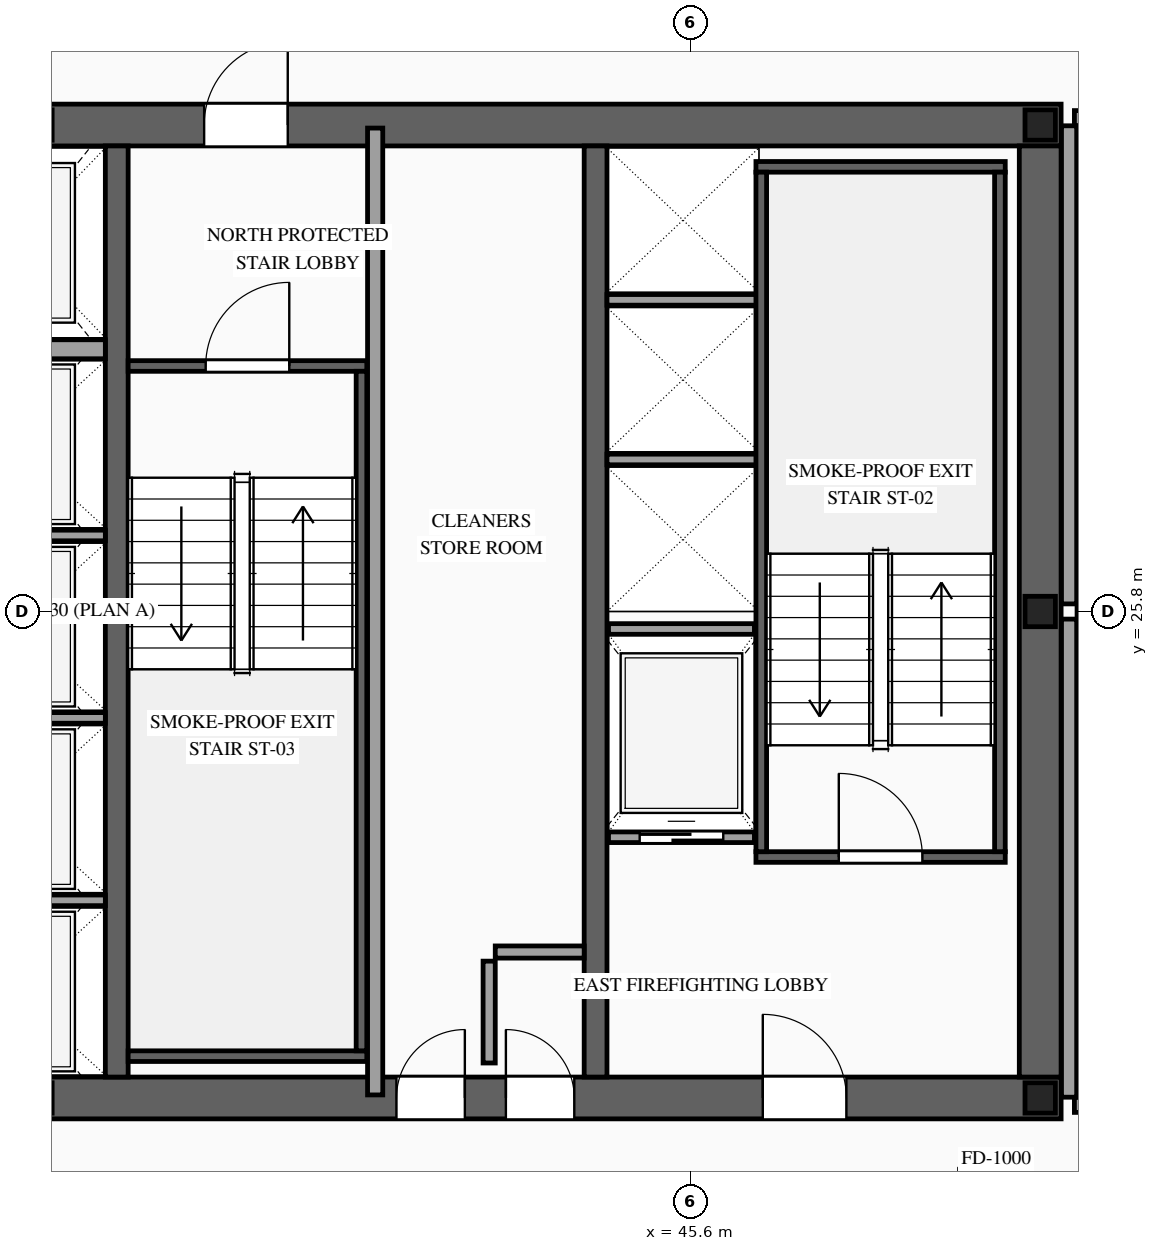
"""IFC4 building model, lengths in metres.
Left out: names, types, materials, properties, quantities, classifications, styles, units other than length and angle.
Written with IfcOpenShell. Run it as: python <this file> out.ifc"""

import sys

from ifc_helpers import new_model, si_unit, direction, frame, frame_2d, origin, origin_2d, place, context, subcontext, project, spatial, rectangle, i_section, extrude, source, transform, mapped, element, fill, save


model = new_model("IFC4")
c1 = context("Model", 3, precision=1e-05, world=origin(), true_north=direction((0.0, 1.0)))
c2 = subcontext(c1, "Body", "Model", "MODEL_VIEW")
j1 = project(units=[si_unit("LENGTHUNIT", "METRE"), si_unit("PLANEANGLEUNIT", "RADIAN")], contexts=[c1])
p1 = place(None, origin())
s1 = spatial("IfcSite", under=j1, at=p1, CompositionType="ELEMENT")
p2 = place(p1, origin())
s2 = spatial("IfcBuilding", under=s1, at=p2, CompositionType="ELEMENT")
p3 = place(p2, frame((0.0, 0.0, 245.1)))
s3 = spatial("IfcBuildingStorey", under=s2, at=p3, CompositionType="ELEMENT", Elevation=245.1)
p4 = place(p3, frame((23.525, 19.4, 0.0), z_axis=(0.0, 0.0, 1.0), x_axis=(1.0, 0.0, 0.0)))
e1 = element("IfcWall", 1, at=p4, inside=s3, PredefinedType="SHEAR", context=c2, shape_type="SweptSolid", body=[
    extrude(rectangle(XDim=26.95, YDim=0.55, at=frame_2d((13.475, 0.0))), origin(), (0.0, 0.0, 1.0), 3.5),
])
p5 = place(p4, frame((1.925, 0.0, 0.0)))
e2 = element("IfcOpeningElement", 2, at=p5, cuts=e1, PredefinedType="OPENING", context=c2, shape_type="SweptSolid", body=[
    extrude(rectangle(XDim=1.1, YDim=2.2, at=frame_2d((0.55, 1.1))), frame((0.0, 0.29, 0.0), z_axis=(0.0, -1.0, 0.0), x_axis=(1.0, 0.0, 0.0)), (0.0, 0.0, 1.0), 0.58),
])
p6 = place(p4, frame((9.825, 0.0, 0.0)))
e3 = element("IfcOpeningElement", 3, at=p6, cuts=e1, PredefinedType="OPENING", context=c2, shape_type="SweptSolid", body=[
    extrude(rectangle(XDim=1.1, YDim=2.2, at=frame_2d((0.55, 1.1))), frame((0.0, 0.29, 0.0), z_axis=(0.0, -1.0, 0.0), x_axis=(1.0, 0.0, 0.0)), (0.0, 0.0, 1.0), 0.58),
])
p7 = place(p4, frame((23.025, 0.0, 0.0)))
e4 = element("IfcOpeningElement", 4, at=p7, cuts=e1, PredefinedType="OPENING", context=c2, shape_type="SweptSolid", body=[
    extrude(rectangle(XDim=1.1, YDim=2.2, at=frame_2d((0.55, 1.1))), frame((0.0, 0.29, 0.0), z_axis=(0.0, -1.0, 0.0), x_axis=(1.0, 0.0, 0.0)), (0.0, 0.0, 1.0), 0.58),
])
p8 = place(p4, frame((19.645, 0.0, 0.0)))
e5 = element("IfcOpeningElement", 5, at=p8, cuts=e1, PredefinedType="OPENING", context=c2, shape_type="SweptSolid", body=[
    extrude(rectangle(XDim=0.9, YDim=2.15, at=frame_2d((0.45, 1.075))), frame((0.0, 0.29, 0.0), z_axis=(0.0, -1.0, 0.0), x_axis=(1.0, 0.0, 0.0)), (0.0, 0.0, 1.0), 0.58),
])
p9 = place(p4, frame((18.205, 0.0, 0.0)))
e6 = element("IfcOpeningElement", 6, at=p9, cuts=e1, PredefinedType="OPENING", context=c2, shape_type="SweptSolid", body=[
    extrude(rectangle(XDim=0.9, YDim=2.15, at=frame_2d((0.45, 1.075))), frame((0.0, 0.29, 0.0), z_axis=(0.0, -1.0, 0.0), x_axis=(1.0, 0.0, 0.0)), (0.0, 0.0, 1.0), 0.58),
])
p10 = place(p3, frame((23.525, 32.2, 0.0), z_axis=(0.0, 0.0, 1.0), x_axis=(1.0, 0.0, 0.0)))
e7 = element("IfcWall", 7, at=p10, inside=s3, PredefinedType="SHEAR", context=c2, shape_type="SweptSolid", body=[
    extrude(rectangle(XDim=26.95, YDim=0.55, at=frame_2d((13.475, 0.0))), origin(), (0.0, 0.0, 1.0), 3.5),
])
p11 = place(p10, frame((4.545, 0.0, 0.0)))
e8 = element("IfcOpeningElement", 8, at=p11, cuts=e7, PredefinedType="OPENING", context=c2, shape_type="SweptSolid", body=[
    extrude(rectangle(XDim=0.9, YDim=2.15, at=frame_2d((0.45, 1.075))), frame((0.0, 0.29, 0.0), z_axis=(0.0, -1.0, 0.0), x_axis=(1.0, 0.0, 0.0)), (0.0, 0.0, 1.0), 0.58),
])
p12 = place(p10, frame((9.825, 0.0, 0.0)))
e9 = element("IfcOpeningElement", 9, at=p12, cuts=e7, PredefinedType="OPENING", context=c2, shape_type="SweptSolid", body=[
    extrude(rectangle(XDim=1.1, YDim=2.2, at=frame_2d((0.55, 1.1))), frame((0.0, 0.29, 0.0), z_axis=(0.0, -1.0, 0.0), x_axis=(1.0, 0.0, 0.0)), (0.0, 0.0, 1.0), 0.58),
])
p13 = place(p10, frame((15.675, 0.0, 0.0)))
e10 = element("IfcOpeningElement", 10, at=p13, cuts=e7, PredefinedType="OPENING", context=c2, shape_type="SweptSolid", body=[
    extrude(rectangle(XDim=1.1, YDim=2.2, at=frame_2d((0.55, 1.1))), frame((0.0, 0.29, 0.0), z_axis=(0.0, -1.0, 0.0), x_axis=(1.0, 0.0, 0.0)), (0.0, 0.0, 1.0), 0.58),
])
m1 = source(origin(), c2, "Body", "SweptSolid", [
    extrude(rectangle(XDim=12.25, YDim=0.55, at=frame_2d((6.125, 0.0))), origin(), (0.0, 0.0, 1.0), 3.5),
])
p14 = place(p3, frame((50.2, 19.675, 0.0), z_axis=(0.0, 0.0, 1.0), x_axis=(0.0, 1.0, 0.0)))
e11 = element("IfcWall", 11, at=p14, inside=s3, PredefinedType="SHEAR", context=c2, shape_type="MappedRepresentation", body=[
    mapped(m1, transform((0.0, 0.0, 0.0), scale=1.0)),
])
m2 = source(origin(), c2, "Body", "SweptSolid", [
    extrude(rectangle(XDim=12.25, YDim=0.3, at=frame_2d((6.125, 0.0))), origin(), (0.0, 0.0, 1.0), 3.5),
])
for number, where, z_axis, x_axis in (
    (12, (38.05, 19.675, 0.0), (0.0, 0.0, 1.0), (0.0, 1.0, 0.0)),
    (13, (44.35, 19.675, 0.0), (0.0, 0.0, 1.0), (0.0, 1.0, 0.0)),
):
    element("IfcWall", number, at=place(p3, frame(where, z_axis=z_axis, x_axis=x_axis)), inside=s3, PredefinedType="SOLIDWALL", context=c2, shape_type="MappedRepresentation", body=[
        mapped(m2, transform((0.0, 0.0, 0.0), scale=1.0)),
    ])
m3 = source(origin(), c2, "Body", "SweptSolid", [
    extrude(i_section(OverallWidth=0.4, OverallDepth=0.4, WebThickness=0.013, FlangeThickness=0.021, at=origin_2d()), origin(), (0.0, 0.0, 1.0), 3.5),
])
for number, where, z_axis, x_axis in (
    (14, (50.2, 19.4, 0.0), (0.0, 0.0, 1.0), (1.0, 0.0, 0.0)),
    (15, (50.2, 25.8, 0.0), (0.0, 0.0, 1.0), (1.0, 0.0, 0.0)),
    (16, (50.2, 32.2, 0.0), (0.0, 0.0, 1.0), (1.0, 0.0, 0.0)),
):
    element("IfcColumn", number, at=place(p3, frame(where, z_axis=z_axis, x_axis=x_axis)), inside=s3, PredefinedType="COLUMN", context=c2, shape_type="MappedRepresentation", body=[
        mapped(m3, transform((0.0, 0.0, 0.0), scale=1.0)),
    ])
p15 = place(p3, frame((44.52, 22.83, 0.0), z_axis=(0.0, 0.0, 1.0), x_axis=(1.0, 0.0, 0.0)))
e17 = element("IfcWall", 17, at=p15, inside=s3, PredefinedType="SOLIDWALL", context=c2, shape_type="SweptSolid", body=[
    extrude(rectangle(XDim=1.92, YDim=0.14, at=frame_2d((0.96, 0.0))), origin(), (0.0, 0.0, 1.0), 3.28),
])
p16 = place(p15, frame((0.41, 0.0, 0.0)))
e18 = element("IfcOpeningElement", 18, at=p16, cuts=e17, PredefinedType="OPENING", context=c2, shape_type="SweptSolid", body=[
    extrude(rectangle(XDim=1.1, YDim=2.2, at=frame_2d((0.55, 1.1))), frame((0.0, 0.085, 0.0), z_axis=(0.0, -1.0, 0.0), x_axis=(1.0, 0.0, 0.0)), (0.0, 0.0, 1.0), 0.17),
])
m4 = source(origin(), c2, "Body", "SweptSolid", [
    extrude(rectangle(XDim=1.92, YDim=0.14, at=frame_2d((0.96, 0.0))), origin(), (0.0, 0.0, 1.0), 3.28),
])
p17 = place(p3, frame((44.52, 25.57, 0.0), z_axis=(0.0, 0.0, 1.0), x_axis=(1.0, 0.0, 0.0)))
e19 = element("IfcWall", 19, at=p17, inside=s3, PredefinedType="SOLIDWALL", context=c2, shape_type="MappedRepresentation", body=[
    mapped(m4, transform((0.0, 0.0, 0.0), scale=1.0)),
])
m5 = source(origin(), c2, "Body", "SweptSolid", [
    extrude(rectangle(XDim=2.4, YDim=0.14, at=frame_2d((1.2, 0.0))), origin(), (0.0, 0.0, 1.0), 3.28),
])
for number, where, z_axis, x_axis in (
    (20, (35.5, 22.0, 0.0), (0.0, 0.0, 1.0), (1.0, 0.0, 0.0)),
    (21, (35.5, 24.4, 0.0), (0.0, 0.0, 1.0), (1.0, 0.0, 0.0)),
    (22, (35.5, 26.8, 0.0), (0.0, 0.0, 1.0), (1.0, 0.0, 0.0)),
):
    element("IfcWall", number, at=place(p3, frame(where, z_axis=z_axis, x_axis=x_axis)), inside=s3, PredefinedType="SOLIDWALL", context=c2, shape_type="MappedRepresentation", body=[
        mapped(m5, transform((0.0, 0.0, 0.0), scale=1.0)),
    ])
m6 = source(origin(), c2, "Body", "SweptSolid", [
    extrude(rectangle(XDim=2.4, YDim=0.25, at=frame_2d((1.2, 0.0))), origin(), (0.0, 0.0, 1.0), 3.28),
])
p18 = place(p3, frame((35.5, 29.25, 0.0), z_axis=(0.0, 0.0, 1.0), x_axis=(1.0, 0.0, 0.0)))
e23 = element("IfcWall", 23, at=p18, inside=s3, PredefinedType="SOLIDWALL", context=c2, shape_type="MappedRepresentation", body=[
    mapped(m6, transform((0.0, 0.0, 0.0), scale=1.0)),
])
m7 = source(origin(), c2, "Body", "SweptSolid", [
    extrude(rectangle(XDim=2.0, YDim=0.14, at=frame_2d((1.0, 0.0))), origin(), (0.0, 0.0, 1.0), 3.28),
])
for number, where, z_axis, x_axis in (
    (24, (44.5, 27.8, 0.0), (0.0, 0.0, 1.0), (1.0, 0.0, 0.0)),
    (25, (44.5, 29.9, 0.0), (0.0, 0.0, 1.0), (1.0, 0.0, 0.0)),
):
    element("IfcWall", number, at=place(p3, frame(where, z_axis=z_axis, x_axis=x_axis)), inside=s3, PredefinedType="SOLIDWALL", context=c2, shape_type="MappedRepresentation", body=[
        mapped(m7, transform((0.0, 0.0, 0.0), scale=1.0)),
    ])
p19 = place(p3, frame((46.46, 22.57, 0.0), z_axis=(0.0, 0.0, 1.0), x_axis=(1.0, 0.0, 0.0)))
e26 = element("IfcWall", 26, at=p19, inside=s3, PredefinedType="SOLIDWALL", context=c2, shape_type="SweptSolid", body=[
    extrude(rectangle(XDim=3.28, YDim=0.14, at=frame_2d((1.64, 0.0))), origin(), (0.0, 0.0, 1.0), 3.28),
])
p20 = place(p19, frame((1.09, 0.0, 0.0)))
e27 = element("IfcOpeningElement", 27, at=p20, cuts=e26, PredefinedType="OPENING", context=c2, shape_type="SweptSolid", body=[
    extrude(rectangle(XDim=1.1, YDim=2.2, at=frame_2d((0.55, 1.1))), frame((0.0, 0.085, 0.0), z_axis=(0.0, -1.0, 0.0), x_axis=(1.0, 0.0, 0.0)), (0.0, 0.0, 1.0), 0.17),
])
m8 = source(origin(), c2, "Body", "SweptSolid", [
    extrude(rectangle(XDim=3.28, YDim=0.14, at=frame_2d((1.64, 0.0))), origin(), (0.0, 0.0, 1.0), 3.28),
])
p21 = place(p3, frame((46.46, 31.65, 0.0), z_axis=(0.0, 0.0, 1.0), x_axis=(1.0, 0.0, 0.0)))
e28 = element("IfcWall", 28, at=p21, inside=s3, PredefinedType="SOLIDWALL", context=c2, shape_type="MappedRepresentation", body=[
    mapped(m8, transform((0.0, 0.0, 0.0), scale=1.0)),
])
m9 = source(origin(), c2, "Body", "SweptSolid", [
    extrude(rectangle(XDim=8.94, YDim=0.14, at=frame_2d((4.47, 0.0))), origin(), (0.0, 0.0, 1.0), 3.28),
])
for number, where, z_axis, x_axis in (
    (29, (46.53, 22.64, 0.0), (0.0, 0.0, 1.0), (0.0, 1.0, 0.0)),
    (30, (49.67, 22.64, 0.0), (0.0, 0.0, 1.0), (0.0, 1.0, 0.0)),
):
    element("IfcWall", number, at=place(p3, frame(where, z_axis=z_axis, x_axis=x_axis)), inside=s3, PredefinedType="SOLIDWALL", context=c2, shape_type="MappedRepresentation", body=[
        mapped(m9, transform((0.0, 0.0, 0.0), scale=1.0)),
    ])
p22 = place(p3, frame((38.2, 29.03, 0.0), z_axis=(0.0, 0.0, 1.0), x_axis=(1.0, 0.0, 0.0)))
e31 = element("IfcWall", 31, at=p22, inside=s3, PredefinedType="SOLIDWALL", context=c2, shape_type="SweptSolid", body=[
    extrude(rectangle(XDim=3.14, YDim=0.14, at=frame_2d((1.57, 0.0))), origin(), (0.0, 0.0, 1.0), 3.28),
])
p23 = place(p22, frame((1.02, 0.0, 0.0)))
e32 = element("IfcOpeningElement", 32, at=p23, cuts=e31, PredefinedType="OPENING", context=c2, shape_type="SweptSolid", body=[
    extrude(rectangle(XDim=1.1, YDim=2.2, at=frame_2d((0.55, 1.1))), frame((0.0, 0.085, 0.0), z_axis=(0.0, -1.0, 0.0), x_axis=(1.0, 0.0, 0.0)), (0.0, 0.0, 1.0), 0.17),
])
m10 = source(origin(), c2, "Body", "SweptSolid", [
    extrude(rectangle(XDim=3.14, YDim=0.14, at=frame_2d((1.57, 0.0))), origin(), (0.0, 0.0, 1.0), 3.28),
])
p24 = place(p3, frame((38.2, 19.95, 0.0), z_axis=(0.0, 0.0, 1.0), x_axis=(1.0, 0.0, 0.0)))
e33 = element("IfcWall", 33, at=p24, inside=s3, PredefinedType="SOLIDWALL", context=c2, shape_type="MappedRepresentation", body=[
    mapped(m10, transform((0.0, 0.0, 0.0), scale=1.0)),
])
m11 = source(origin(), c2, "Body", "SweptSolid", [
    extrude(rectangle(XDim=8.94, YDim=0.14, at=frame_2d((4.47, 0.0))), origin(), (0.0, 0.0, 1.0), 3.28),
])
p25 = place(p3, frame((41.27, 20.02, 0.0), z_axis=(0.0, 0.0, 1.0), x_axis=(0.0, 1.0, 0.0)))
e34 = element("IfcWall", 34, at=p25, inside=s3, PredefinedType="SOLIDWALL", context=c2, shape_type="MappedRepresentation", body=[
    mapped(m11, transform((0.0, 0.0, 0.0), scale=1.0)),
])
m12 = source(origin(), c2, "Body", "SweptSolid", [
    extrude(rectangle(XDim=1.34, YDim=0.16, at=frame_2d((0.67, 0.0))), origin(), (0.0, 0.0, 1.0), 3.28),
])
p26 = place(p3, frame((42.95, 19.86, 0.0), z_axis=(0.0, 0.0, 1.0), x_axis=(0.0, 1.0, 0.0)))
e35 = element("IfcWall", 35, at=p26, inside=s3, PredefinedType="PARTITIONING", context=c2, shape_type="MappedRepresentation", body=[
    mapped(m12, transform((0.0, 0.0, 0.0), scale=1.0)),
])
m13 = source(origin(), c2, "Body", "SweptSolid", [
    extrude(rectangle(XDim=1.17, YDim=0.16, at=frame_2d((0.585, 0.0))), origin(), (0.0, 0.0, 1.0), 3.28),
])
p27 = place(p3, frame((43.03, 21.32, 0.0), z_axis=(0.0, 0.0, 1.0), x_axis=(1.0, 0.0, 0.0)))
e36 = element("IfcWall", 36, at=p27, inside=s3, PredefinedType="PARTITIONING", context=c2, shape_type="MappedRepresentation", body=[
    mapped(m13, transform((0.0, 0.0, 0.0), scale=1.0)),
])
m14 = source(origin(), c2, "Body", "SweptSolid", [
    extrude(rectangle(XDim=12.72, YDim=0.2, at=frame_2d((6.36, 0.0))), origin(), (0.0, 0.0, 1.0), 3.28),
])
p28 = place(p3, frame((41.45, 19.44, 0.0), z_axis=(0.0, 0.0, 1.0), x_axis=(0.0, 1.0, 0.0)))
e37 = element("IfcWall", 37, at=p28, inside=s3, PredefinedType="PARTITIONING", context=c2, shape_type="MappedRepresentation", body=[
    mapped(m14, transform((0.0, 0.0, 0.0), scale=1.0)),
])
p29 = place(p3, frame((50.65, 19.31, 0.0), z_axis=(0.0, 0.0, 1.0), x_axis=(1.0, 0.0, 0.0)))
e38 = element("IfcWall", 38, at=p29, inside=s3, PredefinedType="PARTITIONING", context=c2, shape_type="SweptSolid", body=[
    extrude(rectangle(XDim=6.8, YDim=0.2, at=frame_2d((3.4, 0.0))), origin(), (0.0, 0.0, 1.0), 2.825),
])
p30 = place(p29, frame((2.8, 0.0, 0.0)))
e39 = element("IfcOpeningElement", 39, at=p30, cuts=e38, PredefinedType="OPENING", context=c2, shape_type="SweptSolid", body=[
    extrude(rectangle(XDim=1.0, YDim=2.2, at=frame_2d((0.5, 1.1))), frame((0.0, 0.115, 0.0), z_axis=(0.0, -1.0, 0.0), x_axis=(1.0, 0.0, 0.0)), (0.0, 0.0, 1.0), 0.23),
])
m15 = source(origin(), c2, "Body", "SweptSolid", [
    extrude(rectangle(XDim=6.765, YDim=0.2, at=frame_2d((3.382, 0.0))), origin(), (0.0, 0.0, 1.0), 2.787),
])
p31 = place(p3, frame((50.685, 25.8, 0.0), z_axis=(0.0, 0.0, 1.0), x_axis=(1.0, 0.0, 0.0)))
e40 = element("IfcWall", 40, at=p31, inside=s3, PredefinedType="PARTITIONING", context=c2, shape_type="MappedRepresentation", body=[
    mapped(m15, transform((0.0, 0.0, 0.0), scale=1.0)),
])
m16 = source(origin(), c2, "Body", "SweptSolid", [
    extrude(rectangle(XDim=6.29, YDim=0.2, at=frame_2d((3.145, 0.0))), origin(), (0.0, 0.0, 1.0), 3.28),
])
p32 = place(p3, frame((50.58, 19.41, 0.0), z_axis=(0.0, 0.0, 1.0), x_axis=(0.0, 1.0, 0.0)))
e41 = element("IfcWall", 41, at=p32, inside=s3, PredefinedType="PARTITIONING", context=c2, shape_type="MappedRepresentation", body=[
    mapped(m16, transform((0.0, 0.0, 0.0), scale=1.0)),
])
p33 = place(p3, frame((50.65, 32.29, 0.0), z_axis=(0.0, 0.0, 1.0), x_axis=(1.0, 0.0, 0.0)))
e42 = element("IfcWall", 42, at=p33, inside=s3, PredefinedType="PARTITIONING", context=c2, shape_type="SweptSolid", body=[
    extrude(rectangle(XDim=6.8, YDim=0.2, at=frame_2d((3.4, 0.0))), origin(), (0.0, 0.0, 1.0), 2.825),
])
p34 = place(p33, frame((2.835, 0.0, 0.0)))
e43 = element("IfcOpeningElement", 43, at=p34, cuts=e42, PredefinedType="OPENING", context=c2, shape_type="SweptSolid", body=[
    extrude(rectangle(XDim=1.0, YDim=2.2, at=frame_2d((0.5, 1.1))), frame((0.0, 0.115, 0.0), z_axis=(0.0, -1.0, 0.0), x_axis=(1.0, 0.0, 0.0)), (0.0, 0.0, 1.0), 0.23),
])
p35 = place(p3, frame((50.58, 25.9, 0.0), z_axis=(0.0, 0.0, 1.0), x_axis=(0.0, 1.0, 0.0)))
e44 = element("IfcWall", 44, at=p35, inside=s3, PredefinedType="PARTITIONING", context=c2, shape_type="MappedRepresentation", body=[
    mapped(m16, transform((0.0, 0.0, 0.0), scale=1.0)),
])
m17 = source(origin(), c2, "Body", "SweptSolid", [
    extrude(rectangle(XDim=1.1, YDim=2.2, at=frame_2d((0.55, 1.1))), frame((0.0, 0.025, 0.0), z_axis=(0.0, -1.0, 0.0), x_axis=(1.0, 0.0, 0.0)), (0.0, 0.0, 1.0), 0.05),
])
p36 = place(p16, origin())
e45 = element("IfcDoor", 45, at=p36, inside=s3, OperationType="SLIDING_TO_RIGHT", PredefinedType="DOOR", context=c2, shape_type="MappedRepresentation", body=[
    mapped(m17, transform((0.0, 0.0, 0.0), scale=1.0)),
])
fill(e18, e45)
m18 = source(origin(), c2, "Body", "SweptSolid", [
    extrude(rectangle(XDim=1.1, YDim=2.2, at=frame_2d((0.55, 1.1))), frame((0.0, 0.025, 0.0), z_axis=(0.0, -1.0, 0.0), x_axis=(1.0, 0.0, 0.0)), (0.0, 0.0, 1.0), 0.05),
])
p37 = place(p20, origin())
e46 = element("IfcDoor", 46, at=p37, inside=s3, OperationType="SINGLE_SWING_LEFT", PredefinedType="DOOR", context=c2, shape_type="MappedRepresentation", body=[
    mapped(m18, transform((0.0, 0.0, 0.0), scale=1.0)),
])
fill(e27, e46)
p38 = place(p23, origin())
e47 = element("IfcDoor", 47, at=p38, inside=s3, OperationType="SINGLE_SWING_RIGHT", PredefinedType="DOOR", context=c2, shape_type="MappedRepresentation", body=[
    mapped(m18, transform((0.0, 0.0, 0.0), scale=1.0)),
])
fill(e32, e47)
p39 = place(p7, origin())
e48 = element("IfcDoor", 48, at=p39, inside=s3, OperationType="SINGLE_SWING_LEFT", PredefinedType="DOOR", context=c2, shape_type="MappedRepresentation", body=[
    mapped(m18, transform((0.0, 0.0, 0.0), scale=1.0)),
])
fill(e4, e48)
p40 = place(p13, origin())
e49 = element("IfcDoor", 49, at=p40, inside=s3, OperationType="SINGLE_SWING_RIGHT", PredefinedType="DOOR", context=c2, shape_type="MappedRepresentation", body=[
    mapped(m18, transform((0.0, 0.0, 0.0), scale=1.0)),
])
fill(e10, e49)
m19 = source(origin(), c2, "Body", "SweptSolid", [
    extrude(rectangle(XDim=0.9, YDim=2.15, at=frame_2d((0.45, 1.075))), frame((0.0, 0.025, 0.0), z_axis=(0.0, -1.0, 0.0), x_axis=(1.0, 0.0, 0.0)), (0.0, 0.0, 1.0), 0.05),
])
p41 = place(p8, origin())
e50 = element("IfcDoor", 50, at=p41, inside=s3, OperationType="SINGLE_SWING_LEFT", PredefinedType="DOOR", context=c2, shape_type="MappedRepresentation", body=[
    mapped(m19, transform((0.0, 0.0, 0.0), scale=1.0)),
])
fill(e5, e50)
p42 = place(p9, origin())
e51 = element("IfcDoor", 51, at=p42, inside=s3, OperationType="SINGLE_SWING_RIGHT", PredefinedType="DOOR", context=c2, shape_type="MappedRepresentation", body=[
    mapped(m19, transform((0.0, 0.0, 0.0), scale=1.0)),
])
fill(e6, e51)
save(model, sys.argv[1])
